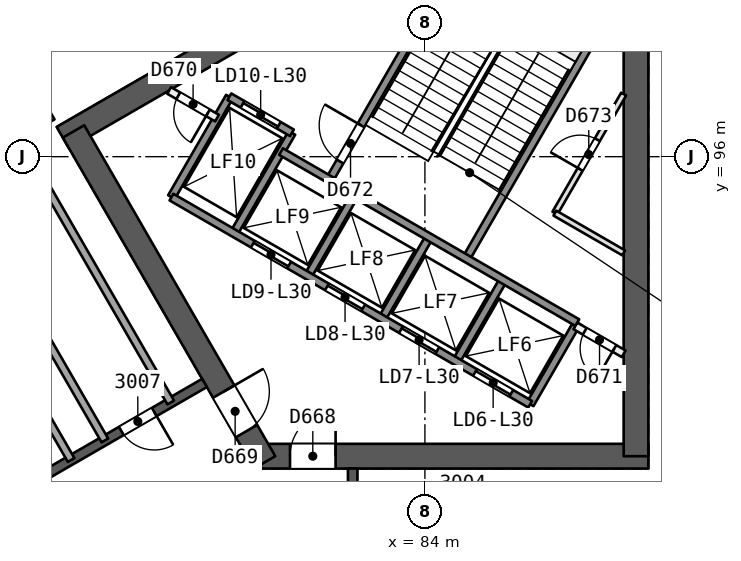
"""IFC4 building model, lengths in metres.
Left out: names, types, materials, properties, quantities, classifications, styles, units other than length and angle.
Written with IfcOpenShell. Run it as: python <this file> out.ifc"""

import sys

from ifc_helpers import new_model, si_unit, direction, frame, frame_2d, origin, place, context, subcontext, project, spatial, rectangle, extrude, element, fill, save


model = new_model("IFC4")
c1 = context("Model", 3, precision=1e-05, world=origin(), true_north=direction((0.0, 1.0)))
c2 = subcontext(c1, "Body", "Model", "MODEL_VIEW")
j1 = project(units=[si_unit("LENGTHUNIT", "METRE"), si_unit("PLANEANGLEUNIT", "RADIAN")], contexts=[c1])
p1 = place(None, origin())
s1 = spatial("IfcSite", under=j1, at=p1, CompositionType="ELEMENT")
p2 = place(p1, origin())
s2 = spatial("IfcBuilding", under=s1, at=p2, CompositionType="ELEMENT")
p3 = place(p2, frame((0.0, 0.0, 125.3)))
s3 = spatial("IfcBuildingStorey", under=s2, at=p3, CompositionType="ELEMENT", Elevation=125.3)
p4 = place(p3, frame((79.688, 88.119, 0.0), z_axis=(0.0, 0.0, 1.0), x_axis=(1.0, 0.0, 0.0)))
e1 = element("IfcWall", 1, at=p4, inside=s3, PredefinedType="SHEAR", context=c2, shape_type="SweptSolid", body=[
    extrude(rectangle(XDim=10.192, YDim=0.65, at=frame_2d((5.096, 0.0))), origin(), (0.0, 0.0, 1.0), 3.7),
])
p5 = place(p4, frame((0.762, 0.0, 0.0)))
e2 = element("IfcOpeningElement", 2, at=p5, cuts=e1, PredefinedType="OPENING", context=c2, shape_type="SweptSolid", body=[
    extrude(rectangle(XDim=1.2, YDim=2.1, at=frame_2d((0.6, 1.05))), frame((0.0, 0.335, 0.0), z_axis=(0.0, -1.0, 0.0), x_axis=(1.0, 0.0, 0.0)), (0.0, 0.0, 1.0), 0.671),
])
p6 = place(p3, frame((89.555, 88.119, 0.0), z_axis=(0.0, 0.0, 1.0), x_axis=(0.0, 1.0, 0.0)))
e3 = element("IfcWall", 3, at=p6, inside=s3, PredefinedType="SHEAR", context=c2, shape_type="SweptSolid", body=[
    extrude(rectangle(XDim=14.009, YDim=0.65, at=frame_2d((7.004, 0.0))), origin(), (0.0, 0.0, 1.0), 3.7),
])
p7 = place(p3, frame((86.723, 103.575, 0.0), z_axis=(0.0, 0.0, 1.0), x_axis=(-0.866031824457, -0.499988878904, 0.0)))
e4 = element("IfcWall", 4, at=p7, inside=s3, PredefinedType="SHEAR", context=c2, shape_type="SweptSolid", body=[
    extrude(rectangle(XDim=14.146, YDim=0.65, at=frame_2d((7.073, 0.0))), origin(), (0.0, 0.0, 1.0), 3.7),
])
p8 = place(p3, frame((74.754, 96.665, 0.0), z_axis=(0.0, 0.0, 1.0), x_axis=(0.500011799426, -0.866018591275, 0.0)))
e5 = element("IfcWall", 5, at=p8, inside=s3, PredefinedType="SHEAR", context=c2, shape_type="SweptSolid", body=[
    extrude(rectangle(XDim=10.055, YDim=0.65, at=frame_2d((5.027, 0.0))), origin(), (0.0, 0.0, 1.0), 3.7),
])
p9 = place(p8, frame((7.905, 0.0, 0.0)))
e6 = element("IfcOpeningElement", 6, at=p9, cuts=e5, PredefinedType="OPENING", context=c2, shape_type="SweptSolid", body=[
    extrude(rectangle(XDim=1.2, YDim=2.1, at=frame_2d((0.6, 1.05))), frame((0.0, 0.335, 0.0), z_axis=(0.0, -1.0, 0.0), x_axis=(1.0, 0.0, 0.0)), (0.0, 0.0, 1.0), 0.671),
])
p10 = place(p3, frame((82.1, 72.206, 0.0), z_axis=(0.0, 0.0, 1.0), x_axis=(0.0, 1.0, 0.0)))
e7 = element("IfcWall", 7, at=p10, inside=s3, PredefinedType="SHEAR", context=c2, shape_type="SweptSolid", body=[
    extrude(rectangle(XDim=15.588, YDim=0.25, at=frame_2d((7.794, 0.0))), origin(), (0.0, 0.0, 1.0), 3.25),
])
p11 = place(p10, frame((2.206, 0.0, 0.0)))
e8 = element("IfcOpeningElement", 8, at=p11, cuts=e7, PredefinedType="OPENING", context=c2, shape_type="SweptSolid", body=[
    extrude(rectangle(XDim=1.2, YDim=2.4, at=frame_2d((0.6, 1.2))), frame((0.0, 0.135, 0.0), z_axis=(0.0, -1.0, 0.0), x_axis=(1.0, 0.0, 0.0)), (0.0, 0.0, 1.0), 0.271),
])
p12 = place(p10, frame((8.003, 0.0, 0.0)))
e9 = element("IfcOpeningElement", 9, at=p12, cuts=e7, PredefinedType="OPENING", context=c2, shape_type="SweptSolid", body=[
    extrude(rectangle(XDim=1.1, YDim=2.1, at=frame_2d((0.55, 1.05))), frame((0.0, 0.135, 0.0), z_axis=(0.0, -1.0, 0.0), x_axis=(1.0, 0.0, 0.0)), (0.0, 0.0, 1.0), 0.271),
])
p13 = place(p10, frame((9.871, 0.0, 0.0)))
e10 = element("IfcOpeningElement", 10, at=p13, cuts=e7, PredefinedType="OPENING", context=c2, shape_type="SweptSolid", body=[
    extrude(rectangle(XDim=1.0, YDim=2.1, at=frame_2d((0.5, 1.05))), frame((0.0, 0.135, 0.0), z_axis=(0.0, -1.0, 0.0), x_axis=(1.0, 0.0, 0.0)), (0.0, 0.0, 1.0), 0.271),
])
p14 = place(p3, frame((78.2, 90.046, 0.0), z_axis=(0.0, 0.0, 1.0), x_axis=(-0.866026492143, -0.499998114903, 0.0)))
e11 = element("IfcWall", 11, at=p14, inside=s3, PredefinedType="SHEAR", context=c2, shape_type="SweptSolid", body=[
    extrude(rectangle(XDim=15.588, YDim=0.25, at=frame_2d((7.794, 0.0))), origin(), (0.0, 0.0, 1.0), 3.25),
])
p15 = place(p14, frame((1.527, 0.0, 0.0)))
e12 = element("IfcOpeningElement", 12, at=p15, cuts=e11, PredefinedType="OPENING", context=c2, shape_type="SweptSolid", body=[
    extrude(rectangle(XDim=1.0, YDim=2.1, at=frame_2d((0.5, 1.05))), frame((0.0, 0.135, 0.0), z_axis=(0.0, -1.0, 0.0), x_axis=(1.0, 0.0, 0.0)), (0.0, 0.0, 1.0), 0.271),
])
p16 = place(p14, frame((8.694, 0.0, 0.0)))
e13 = element("IfcOpeningElement", 13, at=p16, cuts=e11, PredefinedType="OPENING", context=c2, shape_type="SweptSolid", body=[
    extrude(rectangle(XDim=1.1, YDim=2.1, at=frame_2d((0.55, 1.05))), frame((0.0, 0.135, 0.0), z_axis=(0.0, -1.0, 0.0), x_axis=(1.0, 0.0, 0.0)), (0.0, 0.0, 1.0), 0.271),
])
p17 = place(p14, frame((13.062, 0.0, 0.0)))
e14 = element("IfcOpeningElement", 14, at=p17, cuts=e11, PredefinedType="OPENING", context=c2, shape_type="SweptSolid", body=[
    extrude(rectangle(XDim=1.0, YDim=2.1, at=frame_2d((0.5, 1.05))), frame((0.0, 0.135, 0.0), z_axis=(0.0, -1.0, 0.0), x_axis=(1.0, 0.0, 0.0)), (0.0, 0.0, 1.0), 0.271),
])
p18 = place(p3, frame((85.0, 87.595, 0.0), z_axis=(0.0, 0.0, 1.0), x_axis=(0.0, -1.0, 0.0)))
e15 = element("IfcWall", 15, at=p18, inside=s3, PredefinedType="PARTITIONING", context=c2, shape_type="SweptSolid", body=[
    extrude(rectangle(XDim=2.401, YDim=0.15, at=frame_2d((1.2, 0.0))), origin(), (0.0, 0.0, 1.0), 3.25),
])
p19 = place(p18, frame((0.801, 0.0, 0.0)))
e16 = element("IfcOpeningElement", 16, at=p19, cuts=e15, PredefinedType="OPENING", context=c2, shape_type="SweptSolid", body=[
    extrude(rectangle(XDim=0.8, YDim=2.1, at=frame_2d((0.4, 1.05))), frame((0.0, 0.085, 0.0), z_axis=(0.0, -1.0, 0.0), x_axis=(1.0, 0.0, 0.0)), (0.0, 0.0, 1.0), 0.171),
])
p20 = place(p3, frame((74.21, 96.956, 0.0), z_axis=(0.0, 0.0, 1.0), x_axis=(-0.499955758317, 0.866050945225, 0.0)))
e17 = element("IfcWall", 17, at=p20, inside=s3, PredefinedType="PARTITIONING", context=c2, shape_type="SweptSolid", body=[
    extrude(rectangle(XDim=4.348, YDim=0.1, at=frame_2d((2.174, 0.0))), origin(), (0.0, 0.0, 1.0), 3.25),
])
p21 = place(p20, frame((1.724, 0.0, 0.0)))
e18 = element("IfcOpeningElement", 18, at=p21, cuts=e17, PredefinedType="OPENING", context=c2, shape_type="SweptSolid", body=[
    extrude(rectangle(XDim=0.9, YDim=2.1, at=frame_2d((0.45, 1.05))), frame((0.0, 0.061, 0.0), z_axis=(0.0, -1.0, 0.0), x_axis=(1.0, 0.0, 0.0)), (0.0, 0.0, 1.0), 0.121),
])
for number, where, z_axis, x_axis in (
    (19, (75.579, 88.533, 0.0), (0.0, 0.0, 1.0), (-0.5, 0.866, 0.0)),
    (20, (72.811, 97.327, 0.0), (0.0, 0.0, 1.0), (0.5, -0.866, 0.0)),
):
    element("IfcWall", number, at=place(p3, frame(where, z_axis=z_axis, x_axis=x_axis)), inside=s3, PredefinedType="PARTITIONING", context=c2, shape_type="SweptSolid", body=[
        extrude(rectangle(XDim=9.0, YDim=0.2, at=frame_2d((4.5, 0.0))), origin(), (0.0, 0.0, 1.0), 3.25),
    ])
p22 = place(p3, frame((68.527, 98.695, 0.0), z_axis=(0.0, 0.0, 1.0), x_axis=(0.499988187683, -0.866032223522, 0.0)))
e21 = element("IfcWall", 21, at=p22, inside=s3, PredefinedType="PARTITIONING", context=c2, shape_type="SweptSolid", body=[
    extrude(rectangle(XDim=12.327, YDim=0.2, at=frame_2d((6.164, 0.0))), origin(), (0.0, 0.0, 1.0), 3.25),
])
p23 = place(p3, frame((40.836, 82.88, 0.0), z_axis=(0.0, 0.0, 1.0), x_axis=(0.866024964069, 0.500000761609, 0.0)))
e22 = element("IfcWall", 22, at=p23, inside=s3, PredefinedType="SOLIDWALL", context=c2, shape_type="SweptSolid", body=[
    extrude(rectangle(XDim=56.293, YDim=0.3, at=frame_2d((28.147, 0.0))), origin(), (0.0, 0.0, 1.0), 3.25),
])
p24 = place(p23, frame((26.947, 0.0, 0.0)))
e23 = element("IfcOpeningElement", 23, at=p24, cuts=e22, PredefinedType="OPENING", context=c2, shape_type="SweptSolid", body=[
    extrude(rectangle(XDim=2.4, YDim=2.4, at=frame_2d((1.2, 1.2))), frame((0.0, 0.161, 0.0), z_axis=(0.0, -1.0, 0.0), x_axis=(1.0, 0.0, 0.0)), (0.0, 0.0, 1.0), 0.321),
])
p25 = place(p23, frame((32.714, 0.0, 0.0)))
e24 = element("IfcOpeningElement", 24, at=p25, cuts=e22, PredefinedType="OPENING", context=c2, shape_type="SweptSolid", body=[
    extrude(rectangle(XDim=2.4, YDim=2.4, at=frame_2d((1.2, 1.2))), frame((0.0, 0.161, 0.0), z_axis=(0.0, -1.0, 0.0), x_axis=(1.0, 0.0, 0.0)), (0.0, 0.0, 1.0), 0.321),
])
p26 = place(p23, frame((43.711, 0.0, 0.0)))
e25 = element("IfcOpeningElement", 25, at=p26, cuts=e22, PredefinedType="OPENING", context=c2, shape_type="SweptSolid", body=[
    extrude(rectangle(XDim=2.4, YDim=2.4, at=frame_2d((1.2, 1.2))), frame((0.0, 0.161, 0.0), z_axis=(0.0, -1.0, 0.0), x_axis=(1.0, 0.0, 0.0)), (0.0, 0.0, 1.0), 0.321),
])
p27 = place(p23, frame((21.179, 0.0, 0.0)))
e26 = element("IfcOpeningElement", 26, at=p27, cuts=e22, PredefinedType="OPENING", context=c2, shape_type="SweptSolid", body=[
    extrude(rectangle(XDim=2.4, YDim=2.4, at=frame_2d((1.2, 1.2))), frame((0.0, 0.161, 0.0), z_axis=(0.0, -1.0, 0.0), x_axis=(1.0, 0.0, 0.0)), (0.0, 0.0, 1.0), 0.321),
])
p28 = place(p23, frame((10.144, 0.0, 0.0)))
e27 = element("IfcOpeningElement", 27, at=p28, cuts=e22, PredefinedType="OPENING", context=c2, shape_type="SweptSolid", body=[
    extrude(rectangle(XDim=2.4, YDim=2.4, at=frame_2d((1.2, 1.2))), frame((0.0, 0.161, 0.0), z_axis=(0.0, -1.0, 0.0), x_axis=(1.0, 0.0, 0.0)), (0.0, 0.0, 1.0), 0.321),
])
p29 = place(p3, frame((86.77, 89.486, 0.0), z_axis=(0.0, 0.0, 1.0), x_axis=(0.499961042966, 0.86604789447, 0.0)))
e28 = element("IfcWall", 28, at=p29, inside=s3, PredefinedType="SOLIDWALL", context=c2, shape_type="SweptSolid", body=[
    extrude(rectangle(XDim=2.48, YDim=0.2, at=frame_2d((1.24, 0.0))), origin(), (0.0, 0.0, 1.0), 3.25),
])
p30 = place(p3, frame((87.421, 94.514, 0.0), z_axis=(0.0, 0.0, 1.0), x_axis=(0.499993116331, 0.866029378036, 0.0)))
e29 = element("IfcWall", 29, at=p30, inside=s3, PredefinedType="PARTITIONING", context=c2, shape_type="SweptSolid", body=[
    extrude(rectangle(XDim=3.618, YDim=0.15, at=frame_2d((1.809, 0.0))), origin(), (0.0, 0.0, 1.0), 3.25),
])
p31 = place(p30, frame((1.332, 0.0, 0.0)))
e30 = element("IfcOpeningElement", 30, at=p31, cuts=e29, PredefinedType="OPENING", context=c2, shape_type="SweptSolid", body=[
    extrude(rectangle(XDim=0.9, YDim=2.1, at=frame_2d((0.45, 1.05))), frame((0.0, 0.085, 0.0), z_axis=(0.0, -1.0, 0.0), x_axis=(1.0, 0.0, 0.0)), (0.0, 0.0, 1.0), 0.171),
])
p32 = place(p3, frame((84.821, 90.611, 0.0), z_axis=(0.0, 0.0, 1.0), x_axis=(0.499961042966, 0.86604789447, 0.0)))
e31 = element("IfcWall", 31, at=p32, inside=s3, PredefinedType="SOLIDWALL", context=c2, shape_type="SweptSolid", body=[
    extrude(rectangle(XDim=2.48, YDim=0.2, at=frame_2d((1.24, 0.0))), origin(), (0.0, 0.0, 1.0), 3.25),
])
p33 = place(p3, frame((85.087, 93.321, 0.0), z_axis=(0.0, 0.0, 1.0), x_axis=(0.500019787375, 0.866013979237, 0.0)))
e32 = element("IfcWall", 32, at=p33, inside=s3, PredefinedType="SOLIDWALL", context=c2, shape_type="SweptSolid", body=[
    extrude(rectangle(XDim=7.7, YDim=0.2, at=frame_2d((3.85, 0.0))), origin(), (0.0, 0.0, 1.0), 3.25),
])
for number, where, z_axis, x_axis in (
    (33, (82.873, 91.736, 0.0), (0.0, 0.0, 1.0), (0.5, 0.866, 0.0)),
    (34, (80.924, 92.861, 0.0), (0.0, 0.0, 1.0), (0.5, 0.866, 0.0)),
):
    element("IfcWall", number, at=place(p3, frame(where, z_axis=z_axis, x_axis=x_axis)), inside=s3, PredefinedType="SOLIDWALL", context=c2, shape_type="SweptSolid", body=[
        extrude(rectangle(XDim=2.48, YDim=0.2, at=frame_2d((1.24, 0.0))), origin(), (0.0, 0.0, 1.0), 3.25),
    ])
p34 = place(p3, frame((81.493, 95.396, 0.0), z_axis=(0.0, 0.0, 1.0), x_axis=(0.500006057782, 0.866021906294, 0.0)))
e35 = element("IfcWall", 35, at=p34, inside=s3, PredefinedType="SOLIDWALL", context=c2, shape_type="SweptSolid", body=[
    extrude(rectangle(XDim=7.7, YDim=0.2, at=frame_2d((3.85, 0.0))), origin(), (0.0, 0.0, 1.0), 3.25),
])
p35 = place(p34, frame((0.55, 0.0, 0.0)))
e36 = element("IfcOpeningElement", 36, at=p35, cuts=e35, PredefinedType="OPENING", context=c2, shape_type="SweptSolid", body=[
    extrude(rectangle(XDim=1.1, YDim=2.1, at=frame_2d((0.55, 1.05))), frame((0.0, 0.11, 0.0), z_axis=(0.0, -1.0, 0.0), x_axis=(1.0, 0.0, 0.0)), (0.0, 0.0, 1.0), 0.221),
])
for number, where, z_axis, x_axis in (
    (37, (78.976, 93.986, 0.0), (0.0, 0.0, 1.0), (0.5, 0.866, 0.0)),
    (38, (77.33, 94.936, 0.0), (0.0, 0.0, 1.0), (0.5, 0.866, 0.0)),
):
    element("IfcWall", number, at=place(p3, frame(where, z_axis=z_axis, x_axis=x_axis)), inside=s3, PredefinedType="SOLIDWALL", context=c2, shape_type="SweptSolid", body=[
        extrude(rectangle(XDim=3.05, YDim=0.2, at=frame_2d((1.525, 0.0))), origin(), (0.0, 0.0, 1.0), 3.25),
    ])
p36 = place(p3, frame((86.77, 89.486, 0.0), z_axis=(0.0, 0.0, 1.0), x_axis=(-0.86601811187, 0.500012629753, 0.0)))
e39 = element("IfcWall", 39, at=p36, inside=s3, PredefinedType="SOLIDWALL", context=c2, shape_type="SweptSolid", body=[
    extrude(rectangle(XDim=10.9, YDim=0.2, at=frame_2d((5.45, 0.0))), origin(), (0.0, 0.0, 1.0), 3.25),
])
p37 = place(p36, frame((0.575, 0.0, 0.0)))
e40 = element("IfcOpeningElement", 40, at=p37, cuts=e39, PredefinedType="OPENING", context=c2, shape_type="SweptSolid", body=[
    extrude(rectangle(XDim=1.1, YDim=2.1, at=frame_2d((0.55, 1.05))), frame((0.0, 0.11, 0.0), z_axis=(0.0, -1.0, 0.0), x_axis=(1.0, 0.0, 0.0)), (0.0, 0.0, 1.0), 0.221),
])
p38 = place(p36, frame((2.825, 0.0, 0.0)))
e41 = element("IfcOpeningElement", 41, at=p38, cuts=e39, PredefinedType="OPENING", context=c2, shape_type="SweptSolid", body=[
    extrude(rectangle(XDim=1.1, YDim=2.1, at=frame_2d((0.55, 1.05))), frame((0.0, 0.11, 0.0), z_axis=(0.0, -1.0, 0.0), x_axis=(1.0, 0.0, 0.0)), (0.0, 0.0, 1.0), 0.221),
])
p39 = place(p36, frame((5.075, 0.0, 0.0)))
e42 = element("IfcOpeningElement", 42, at=p39, cuts=e39, PredefinedType="OPENING", context=c2, shape_type="SweptSolid", body=[
    extrude(rectangle(XDim=1.1, YDim=2.1, at=frame_2d((0.55, 1.05))), frame((0.0, 0.11, 0.0), z_axis=(0.0, -1.0, 0.0), x_axis=(1.0, 0.0, 0.0)), (0.0, 0.0, 1.0), 0.221),
])
p40 = place(p36, frame((7.325, 0.0, 0.0)))
e43 = element("IfcOpeningElement", 43, at=p40, cuts=e39, PredefinedType="OPENING", context=c2, shape_type="SweptSolid", body=[
    extrude(rectangle(XDim=1.1, YDim=2.1, at=frame_2d((0.55, 1.05))), frame((0.0, 0.11, 0.0), z_axis=(0.0, -1.0, 0.0), x_axis=(1.0, 0.0, 0.0)), (0.0, 0.0, 1.0), 0.221),
])
p41 = place(p3, frame((89.23, 90.814, 0.0), z_axis=(0.0, 0.0, 1.0), x_axis=(-0.866022048785, 0.500005810984, 0.0)))
e44 = element("IfcWall", 44, at=p41, inside=s3, PredefinedType="PARTITIONING", context=c2, shape_type="SweptSolid", body=[
    extrude(rectangle(XDim=1.467, YDim=0.2, at=frame_2d((0.733, 0.0))), origin(), (0.0, 0.0, 1.0), 3.25),
])
p42 = place(p41, frame((0.283, 0.0, 0.0)))
e45 = element("IfcOpeningElement", 45, at=p42, cuts=e44, PredefinedType="OPENING", context=c2, shape_type="SweptSolid", body=[
    extrude(rectangle(XDim=0.9, YDim=2.1, at=frame_2d((0.45, 1.05))), frame((0.0, 0.11, 0.0), z_axis=(0.0, -1.0, 0.0), x_axis=(1.0, 0.0, 0.0)), (0.0, 0.0, 1.0), 0.221),
])
p43 = place(p3, frame((78.53, 97.014, 0.0), z_axis=(0.0, 0.0, 1.0), x_axis=(-0.866045896294, 0.499964504253, 0.0)))
e46 = element("IfcWall", 46, at=p43, inside=s3, PredefinedType="PARTITIONING", context=c2, shape_type="SweptSolid", body=[
    extrude(rectangle(XDim=1.455, YDim=0.2, at=frame_2d((0.728, 0.0))), origin(), (0.0, 0.0, 1.0), 3.25),
])
p44 = place(p43, frame((0.278, 0.0, 0.0)))
e47 = element("IfcOpeningElement", 47, at=p44, cuts=e46, PredefinedType="OPENING", context=c2, shape_type="SweptSolid", body=[
    extrude(rectangle(XDim=0.9, YDim=2.1, at=frame_2d((0.45, 1.05))), frame((0.0, 0.11, 0.0), z_axis=(0.0, -1.0, 0.0), x_axis=(1.0, 0.0, 0.0)), (0.0, 0.0, 1.0), 0.221),
])
p45 = place(p3, frame((88.01, 91.634, 0.0), z_axis=(0.0, 0.0, 1.0), x_axis=(-0.866024315419, 0.5000018851, 0.0)))
e48 = element("IfcWall", 48, at=p45, inside=s3, PredefinedType="SOLIDWALL", context=c2, shape_type="SweptSolid", body=[
    extrude(rectangle(XDim=9.0, YDim=0.2, at=frame_2d((4.5, 0.0))), origin(), (0.0, 0.0, 1.0), 3.25),
])
p46 = place(p3, frame((80.5, 96.627, 0.0), z_axis=(0.0, 0.0, 1.0), x_axis=(-0.86601224135, 0.500022797313, 0.0)))
e49 = element("IfcWall", 49, at=p46, inside=s3, PredefinedType="SOLIDWALL", context=c2, shape_type="SweptSolid", body=[
    extrude(rectangle(XDim=1.9, YDim=0.2, at=frame_2d((0.95, 0.0))), origin(), (0.0, 0.0, 1.0), 3.25),
])
p47 = place(p46, frame((0.4, 0.0, 0.0)))
e50 = element("IfcOpeningElement", 50, at=p47, cuts=e49, PredefinedType="OPENING", context=c2, shape_type="SweptSolid", body=[
    extrude(rectangle(XDim=1.1, YDim=2.1, at=frame_2d((0.55, 1.05))), frame((0.0, 0.11, 0.0), z_axis=(0.0, -1.0, 0.0), x_axis=(1.0, 0.0, 0.0)), (0.0, 0.0, 1.0), 0.221),
])
p48 = place(p3, frame((89.23, 93.469, 0.0), z_axis=(0.0, 0.0, 1.0), x_axis=(-0.866004557827, 0.500036104519, 0.0)))
e51 = element("IfcWall", 51, at=p48, inside=s3, PredefinedType="PARTITIONING", context=c2, shape_type="SweptSolid", body=[
    extrude(rectangle(XDim=2.089, YDim=0.15, at=frame_2d((1.044, 0.0))), origin(), (0.0, 0.0, 1.0), 3.25),
])
p49 = place(p15, origin())
e52 = element("IfcDoor", 52, at=p49, inside=s3, OperationType="SINGLE_SWING_LEFT", PredefinedType="NOTDEFINED", context=c2, shape_type="SweptSolid", body=[
    extrude(rectangle(XDim=1.0, YDim=2.1, at=frame_2d((0.5, 1.05))), frame((0.0, 0.025, 0.0), z_axis=(0.0, -1.0, 0.0), x_axis=(1.0, 0.0, 0.0)), (0.0, 0.0, 1.0), 0.05),
])
fill(e12, e52)
p50 = place(p5, origin())
e53 = element("IfcDoor", 53, at=p50, inside=s3, OperationType="SINGLE_SWING_RIGHT", PredefinedType="NOTDEFINED", context=c2, shape_type="SweptSolid", body=[
    extrude(rectangle(XDim=1.2, YDim=2.1, at=frame_2d((0.6, 1.05))), frame((0.0, 0.025, 0.0), z_axis=(0.0, -1.0, 0.0), x_axis=(1.0, 0.0, 0.0)), (0.0, 0.0, 1.0), 0.05),
])
fill(e2, e53)
p51 = place(p9, origin())
e54 = element("IfcDoor", 54, at=p51, inside=s3, OperationType="SINGLE_SWING_LEFT", PredefinedType="NOTDEFINED", context=c2, shape_type="SweptSolid", body=[
    extrude(rectangle(XDim=1.2, YDim=2.1, at=frame_2d((0.6, 1.05))), frame((0.0, 0.025, 0.0), z_axis=(0.0, -1.0, 0.0), x_axis=(1.0, 0.0, 0.0)), (0.0, 0.0, 1.0), 0.05),
])
fill(e6, e54)
p52 = place(p37, origin())
e55 = element("IfcDoor", 55, at=p52, inside=s3, OperationType="SLIDING_TO_RIGHT", PredefinedType="NOTDEFINED", context=c2, shape_type="SweptSolid", body=[
    extrude(rectangle(XDim=1.1, YDim=2.1, at=frame_2d((0.55, 1.05))), frame((0.0, 0.025, 0.0), z_axis=(0.0, -1.0, 0.0), x_axis=(1.0, 0.0, 0.0)), (0.0, 0.0, 1.0), 0.05),
])
fill(e40, e55)
p53 = place(p38, origin())
e56 = element("IfcDoor", 56, at=p53, inside=s3, OperationType="SLIDING_TO_LEFT", PredefinedType="NOTDEFINED", context=c2, shape_type="SweptSolid", body=[
    extrude(rectangle(XDim=1.1, YDim=2.1, at=frame_2d((0.55, 1.05))), frame((0.0, 0.025, 0.0), z_axis=(0.0, -1.0, 0.0), x_axis=(1.0, 0.0, 0.0)), (0.0, 0.0, 1.0), 0.05),
])
fill(e41, e56)
p54 = place(p39, origin())
e57 = element("IfcDoor", 57, at=p54, inside=s3, OperationType="SLIDING_TO_RIGHT", PredefinedType="NOTDEFINED", context=c2, shape_type="SweptSolid", body=[
    extrude(rectangle(XDim=1.1, YDim=2.1, at=frame_2d((0.55, 1.05))), frame((0.0, 0.025, 0.0), z_axis=(0.0, -1.0, 0.0), x_axis=(1.0, 0.0, 0.0)), (0.0, 0.0, 1.0), 0.05),
])
fill(e42, e57)
p55 = place(p40, origin())
e58 = element("IfcDoor", 58, at=p55, inside=s3, OperationType="SLIDING_TO_LEFT", PredefinedType="NOTDEFINED", context=c2, shape_type="SweptSolid", body=[
    extrude(rectangle(XDim=1.1, YDim=2.1, at=frame_2d((0.55, 1.05))), frame((0.0, 0.025, 0.0), z_axis=(0.0, -1.0, 0.0), x_axis=(1.0, 0.0, 0.0)), (0.0, 0.0, 1.0), 0.05),
])
fill(e43, e58)
p56 = place(p47, origin())
e59 = element("IfcDoor", 59, at=p56, inside=s3, OperationType="SLIDING_TO_RIGHT", PredefinedType="NOTDEFINED", context=c2, shape_type="SweptSolid", body=[
    extrude(rectangle(XDim=1.1, YDim=2.1, at=frame_2d((0.55, 1.05))), frame((0.0, 0.025, 0.0), z_axis=(0.0, -1.0, 0.0), x_axis=(1.0, 0.0, 0.0)), (0.0, 0.0, 1.0), 0.05),
])
fill(e50, e59)
p57 = place(p44, origin())
e60 = element("IfcDoor", 60, at=p57, inside=s3, OperationType="SINGLE_SWING_LEFT", PredefinedType="NOTDEFINED", context=c2, shape_type="SweptSolid", body=[
    extrude(rectangle(XDim=0.9, YDim=2.1, at=frame_2d((0.45, 1.05))), frame((0.0, 0.025, 0.0), z_axis=(0.0, -1.0, 0.0), x_axis=(1.0, 0.0, 0.0)), (0.0, 0.0, 1.0), 0.05),
])
fill(e47, e60)
p58 = place(p42, origin())
e61 = element("IfcDoor", 61, at=p58, inside=s3, OperationType="SINGLE_SWING_LEFT", PredefinedType="NOTDEFINED", context=c2, shape_type="SweptSolid", body=[
    extrude(rectangle(XDim=0.9, YDim=2.1, at=frame_2d((0.45, 1.05))), frame((0.0, 0.025, 0.0), z_axis=(0.0, -1.0, 0.0), x_axis=(1.0, 0.0, 0.0)), (0.0, 0.0, 1.0), 0.05),
])
fill(e45, e61)
p59 = place(p35, origin())
e62 = element("IfcDoor", 62, at=p59, inside=s3, OperationType="SINGLE_SWING_RIGHT", PredefinedType="NOTDEFINED", context=c2, shape_type="SweptSolid", body=[
    extrude(rectangle(XDim=1.1, YDim=2.1, at=frame_2d((0.55, 1.05))), frame((0.0, 0.025, 0.0), z_axis=(0.0, -1.0, 0.0), x_axis=(1.0, 0.0, 0.0)), (0.0, 0.0, 1.0), 0.05),
])
fill(e36, e62)
p60 = place(p31, origin())
e63 = element("IfcDoor", 63, at=p60, inside=s3, OperationType="SINGLE_SWING_LEFT", PredefinedType="NOTDEFINED", context=c2, shape_type="SweptSolid", body=[
    extrude(rectangle(XDim=0.9, YDim=2.1, at=frame_2d((0.45, 1.05))), frame((0.0, 0.025, 0.0), z_axis=(0.0, -1.0, 0.0), x_axis=(1.0, 0.0, 0.0)), (0.0, 0.0, 1.0), 0.05),
])
fill(e30, e63)
save(model, sys.argv[1])
